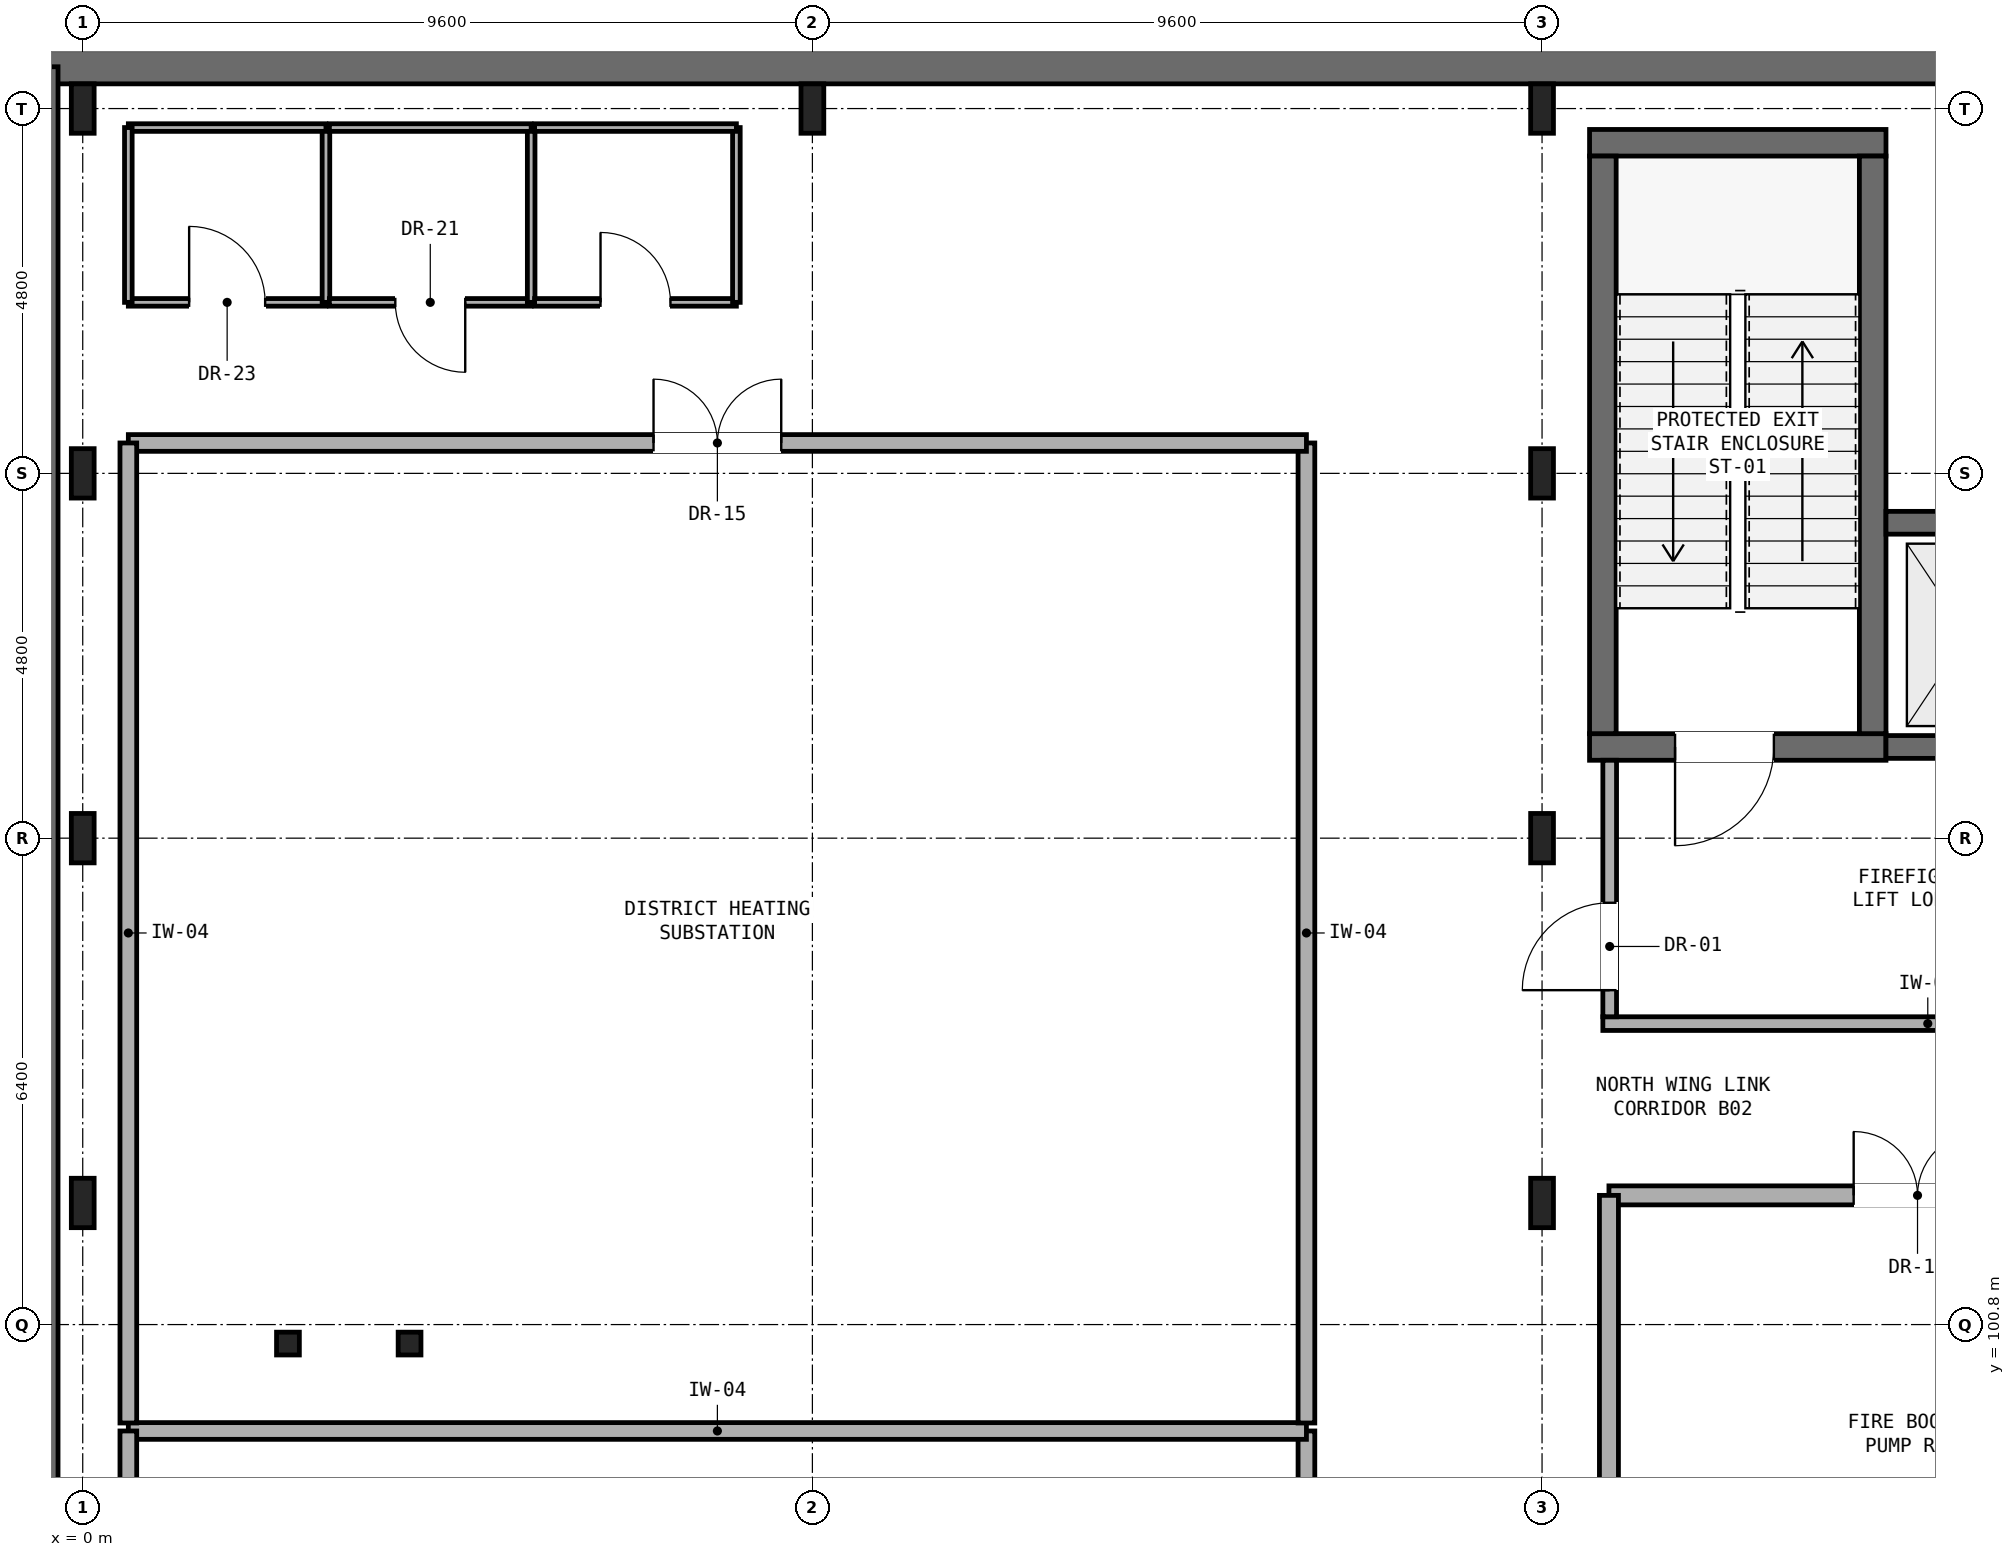
"""IFC4 building model, lengths in metres.
Left out: names, types, materials, properties, quantities, classifications, styles, units other than length and angle.
Written with IfcOpenShell. Run it as: python <this file> out.ifc"""

import sys

from ifc_helpers import new_model, si_unit, direction, frame, frame_2d, origin, origin_2d, place, context, subcontext, project, spatial, rectangle, i_section, extrude, element, fill, save


model = new_model("IFC4")
c1 = context("Model", 3, precision=1e-05, world=origin(), true_north=direction((0.0, 1.0)))
c2 = subcontext(c1, "Body", "Model", "MODEL_VIEW")
j1 = project(units=[si_unit("LENGTHUNIT", "METRE"), si_unit("PLANEANGLEUNIT", "RADIAN")], contexts=[c1])
p1 = place(None, origin())
s1 = spatial("IfcSite", under=j1, at=p1, CompositionType="ELEMENT")
p2 = place(p1, origin())
s2 = spatial("IfcBuilding", under=s1, at=p2, CompositionType="ELEMENT")
p3 = place(p2, frame((0.0, 0.0, -9.8)))
s3 = spatial("IfcBuildingStorey", under=s2, at=p3, CompositionType="ELEMENT", Elevation=-9.8)
for number, where, z_axis, x_axis in (
    (1, (0.0, 102.4, 0.0), (0.0, 0.0, 1.0), (1.0, 0.0, 0.0)),
    (2, (0.0, 107.2, 0.0), (0.0, 0.0, 1.0), (1.0, 0.0, 0.0)),
    (3, (0.0, 112.0, 0.0), (0.0, 0.0, 1.0), (1.0, 0.0, 0.0)),
    (4, (0.0, 116.8, 0.0), (0.0, 0.0, 1.0), (1.0, 0.0, 0.0)),
    (5, (9.6, 116.8, 0.0), (0.0, 0.0, 1.0), (1.0, 0.0, 0.0)),
    (6, (19.2, 116.8, 0.0), (0.0, 0.0, 1.0), (1.0, 0.0, 0.0)),
    (7, (19.2, 102.4, 0.0), (0.0, 0.0, 1.0), (1.0, 0.0, 0.0)),
    (8, (19.2, 107.2, 0.0), (0.0, 0.0, 1.0), (1.0, 0.0, 0.0)),
    (9, (19.2, 112.0, 0.0), (0.0, 0.0, 1.0), (1.0, 0.0, 0.0)),
):
    element("IfcColumn", number, at=place(p3, frame(where, z_axis=z_axis, x_axis=x_axis)), inside=s3, PredefinedType="COLUMN", context=c2, shape_type="SweptSolid", body=[
        extrude(i_section(OverallWidth=0.3, OverallDepth=0.65, WebThickness=0.016, FlangeThickness=0.031, FilletRadius=0.027, at=origin_2d()), origin(), (0.0, 0.0, 1.0), 5.25),
    ])
p4 = place(p3, frame((-0.55, 117.35, 0.0), z_axis=(0.0, 0.0, 1.0), x_axis=(1.0, 0.0, 0.0)))
e10 = element("IfcWall", 10, at=p4, inside=s3, PredefinedType="USERDEFINED", context=c2, shape_type="SweptSolid", body=[
    extrude(rectangle(XDim=87.5, YDim=0.45, at=frame_2d((43.75, 0.0))), origin(), (0.0, 0.0, 1.0), 5.25),
])
p5 = place(p3, frame((-0.55, 28.25, 0.0), z_axis=(0.0, 0.0, 1.0), x_axis=(0.0, 1.0, 0.0)))
e11 = element("IfcWall", 11, at=p5, inside=s3, PredefinedType="USERDEFINED", context=c2, shape_type="SweptSolid", body=[
    extrude(rectangle(XDim=89.1, YDim=0.45, at=frame_2d((44.55, 0.0))), origin(), (0.0, 0.0, 1.0), 5.25),
])
p6 = place(p3, frame((19.825, 108.4, 0.0), z_axis=(0.0, 0.0, 1.0), x_axis=(1.0, 0.0, 0.0)))
e12 = element("IfcWall", 12, at=p6, inside=s3, PredefinedType="SHEAR", context=c2, shape_type="SweptSolid", body=[
    extrude(rectangle(XDim=3.9, YDim=0.35, at=frame_2d((1.95, 0.0))), origin(), (0.0, 0.0, 1.0), 4.97),
])
p7 = place(p6, frame((1.125, 0.0, 0.0)))
e13 = element("IfcOpeningElement", 13, at=p7, cuts=e12, PredefinedType="OPENING", context=c2, shape_type="SweptSolid", body=[
    extrude(rectangle(XDim=1.3, YDim=2.15, at=frame_2d((0.65, 1.075))), frame((0.0, 0.185, 0.0), z_axis=(0.0, -1.0, 0.0), x_axis=(1.0, 0.0, 0.0)), (0.0, 0.0, 1.0), 0.37),
])
p8 = place(p3, frame((19.825, 116.35, 0.0), z_axis=(0.0, 0.0, 1.0), x_axis=(1.0, 0.0, 0.0)))
e14 = element("IfcWall", 14, at=p8, inside=s3, PredefinedType="SHEAR", context=c2, shape_type="SweptSolid", body=[
    extrude(rectangle(XDim=3.9, YDim=0.35, at=frame_2d((1.95, 0.0))), origin(), (0.0, 0.0, 1.0), 4.97),
])
for number, where, z_axis, x_axis in (
    (15, (20.0, 108.575, 0.0), (0.0, 0.0, 1.0), (0.0, 1.0, 0.0)),
    (16, (23.55, 108.575, 0.0), (0.0, 0.0, 1.0), (0.0, 1.0, 0.0)),
):
    element("IfcWall", number, at=place(p3, frame(where, z_axis=z_axis, x_axis=x_axis)), inside=s3, PredefinedType="SHEAR", context=c2, shape_type="SweptSolid", body=[
        extrude(rectangle(XDim=7.6, YDim=0.35, at=frame_2d((3.8, 0.0))), origin(), (0.0, 0.0, 1.0), 4.97),
    ])
p9 = place(p3, frame((23.725, 108.4, 0.0), z_axis=(0.0, 0.0, 1.0), x_axis=(1.0, 0.0, 0.0)))
e17 = element("IfcWall", 17, at=p9, inside=s3, PredefinedType="SHEAR", context=c2, shape_type="SweptSolid", body=[
    extrude(rectangle(XDim=2.5, YDim=0.3, at=frame_2d((1.25, 0.0))), origin(), (0.0, 0.0, 1.0), 4.97),
])
p10 = place(p9, frame((0.7, 0.0, 0.0)))
e18 = element("IfcOpeningElement", 18, at=p10, cuts=e17, PredefinedType="OPENING", context=c2, shape_type="SweptSolid", body=[
    extrude(rectangle(XDim=1.1, YDim=2.1, at=frame_2d((0.55, 1.05))), frame((0.0, 0.16, 0.0), z_axis=(0.0, -1.0, 0.0), x_axis=(1.0, 0.0, 0.0)), (0.0, 0.0, 1.0), 0.32),
])
p11 = place(p3, frame((23.725, 111.35, 0.0), z_axis=(0.0, 0.0, 1.0), x_axis=(1.0, 0.0, 0.0)))
e19 = element("IfcWall", 19, at=p11, inside=s3, PredefinedType="SHEAR", context=c2, shape_type="SweptSolid", body=[
    extrude(rectangle(XDim=2.5, YDim=0.3, at=frame_2d((1.25, 0.0))), origin(), (0.0, 0.0, 1.0), 4.97),
])
p12 = place(p3, frame((20.0, 104.76, 0.0), z_axis=(0.0, 0.0, 1.0), x_axis=(1.0, 0.0, 0.0)))
e20 = element("IfcWall", 20, at=p12, inside=s3, PredefinedType="PARTITIONING", context=c2, shape_type="SweptSolid", body=[
    extrude(rectangle(XDim=8.55, YDim=0.18, at=frame_2d((4.275, 0.0))), origin(), (0.0, 0.0, 1.0), 4.45),
])
p13 = place(p3, frame((20.09, 104.85, 0.0), z_axis=(0.0, 0.0, 1.0), x_axis=(0.0, 1.0, 0.0)))
e21 = element("IfcWall", 21, at=p13, inside=s3, PredefinedType="PARTITIONING", context=c2, shape_type="SweptSolid", body=[
    extrude(rectangle(XDim=3.375, YDim=0.18, at=frame_2d((1.688, 0.0))), origin(), (0.0, 0.0, 1.0), 4.97),
])
p14 = place(p13, frame((0.35, 0.0, 0.0)))
e22 = element("IfcOpeningElement", 22, at=p14, cuts=e21, PredefinedType="OPENING", context=c2, shape_type="SweptSolid", body=[
    extrude(rectangle(XDim=1.15, YDim=2.15, at=frame_2d((0.575, 1.075))), frame((0.0, 0.1, 0.0), z_axis=(0.0, -1.0, 0.0), x_axis=(1.0, 0.0, 0.0)), (0.0, 0.0, 1.0), 0.2),
])
for number, where, z_axis, x_axis in (
    (23, (2.7, 100.55, 0.0), (0.0, 0.0, 1.0), (1.0, 0.0, 0.0)),
    (24, (4.3, 100.55, 0.0), (0.0, 0.0, 1.0), (1.0, 0.0, 0.0)),
):
    element("IfcColumn", number, at=place(p3, frame(where, z_axis=z_axis, x_axis=x_axis)), inside=s3, PredefinedType="COLUMN", context=c2, shape_type="SweptSolid", body=[
        extrude(i_section(OverallWidth=0.3, OverallDepth=0.3, WebThickness=0.011, FlangeThickness=0.019, FilletRadius=0.027, at=origin_2d()), origin(), (0.0, 0.0, 1.0), 5.25),
    ])
p15 = place(p3, frame((16.1, 83.8, 0.0), z_axis=(0.0, 0.0, 1.0), x_axis=(0.0, 1.0, 0.0)))
e25 = element("IfcWall", 25, at=p15, inside=s3, PredefinedType="PARTITIONING", context=c2, shape_type="SweptSolid", body=[
    extrude(rectangle(XDim=15.6, YDim=0.22, at=frame_2d((7.8, 0.0))), origin(), (0.0, 0.0, 1.0), 4.97),
])
p16 = place(p15, frame((6.96, 0.0, 0.0)))
e26 = element("IfcOpeningElement", 26, at=p16, cuts=e25, PredefinedType="OPENING", context=c2, shape_type="SweptSolid", body=[
    extrude(rectangle(XDim=1.68, YDim=2.2, at=frame_2d((0.84, 1.1))), frame((0.0, 0.12, 0.0), z_axis=(0.0, -1.0, 0.0), x_axis=(1.0, 0.0, 0.0)), (0.0, 0.0, 1.0), 0.24),
])
p17 = place(p3, frame((16.1, 99.4, 0.0), z_axis=(0.0, 0.0, 1.0), x_axis=(-1.0, 0.0, 0.0)))
e27 = element("IfcWall", 27, at=p17, inside=s3, PredefinedType="PARTITIONING", context=c2, shape_type="SweptSolid", body=[
    extrude(rectangle(XDim=15.5, YDim=0.22, at=frame_2d((7.75, 0.0))), origin(), (0.0, 0.0, 1.0), 4.97),
])
p18 = place(p3, frame((0.6, 99.4, 0.0), z_axis=(0.0, 0.0, 1.0), x_axis=(0.0, -1.0, 0.0)))
e28 = element("IfcWall", 28, at=p18, inside=s3, PredefinedType="PARTITIONING", context=c2, shape_type="SweptSolid", body=[
    extrude(rectangle(XDim=15.6, YDim=0.22, at=frame_2d((7.8, 0.0))), origin(), (0.0, 0.0, 1.0), 4.97),
])
p19 = place(p3, frame((16.1, 99.505, 0.0), z_axis=(0.0, 0.0, 1.0), x_axis=(0.0, 1.0, 0.0)))
e29 = element("IfcWall", 29, at=p19, inside=s3, PredefinedType="PARTITIONING", context=c2, shape_type="SweptSolid", body=[
    extrude(rectangle(XDim=12.895, YDim=0.22, at=frame_2d((6.448, 0.0))), origin(), (0.0, 0.0, 1.0), 4.97),
])
p20 = place(p3, frame((16.1, 112.4, 0.0), z_axis=(0.0, 0.0, 1.0), x_axis=(-1.0, 0.0, 0.0)))
e30 = element("IfcWall", 30, at=p20, inside=s3, PredefinedType="PARTITIONING", context=c2, shape_type="SweptSolid", body=[
    extrude(rectangle(XDim=15.5, YDim=0.22, at=frame_2d((7.75, 0.0))), origin(), (0.0, 0.0, 1.0), 4.97),
])
p21 = place(p20, frame((6.91, 0.0, 0.0)))
e31 = element("IfcOpeningElement", 31, at=p21, cuts=e30, PredefinedType="OPENING", context=c2, shape_type="SweptSolid", body=[
    extrude(rectangle(XDim=1.68, YDim=2.2, at=frame_2d((0.84, 1.1))), frame((0.0, 0.12, 0.0), z_axis=(0.0, -1.0, 0.0), x_axis=(1.0, 0.0, 0.0)), (0.0, 0.0, 1.0), 0.24),
])
p22 = place(p3, frame((0.6, 112.4, 0.0), z_axis=(0.0, 0.0, 1.0), x_axis=(0.0, -1.0, 0.0)))
e32 = element("IfcWall", 32, at=p22, inside=s3, PredefinedType="PARTITIONING", context=c2, shape_type="SweptSolid", body=[
    extrude(rectangle(XDim=12.895, YDim=0.22, at=frame_2d((6.448, 0.0))), origin(), (0.0, 0.0, 1.0), 4.97),
])
p23 = place(p3, frame((0.6, 114.25, 0.0), z_axis=(0.0, 0.0, 1.0), x_axis=(1.0, 0.0, 0.0)))
e33 = element("IfcWall", 33, at=p23, inside=s3, PredefinedType="PARTITIONING", context=c2, shape_type="SweptSolid", body=[
    extrude(rectangle(XDim=2.6, YDim=0.1, at=frame_2d((1.3, 0.0))), origin(), (0.0, 0.0, 1.0), 4.45),
])
p24 = place(p23, frame((0.8, 0.0, 0.0)))
e34 = element("IfcOpeningElement", 34, at=p24, cuts=e33, PredefinedType="OPENING", context=c2, shape_type="SweptSolid", body=[
    extrude(rectangle(XDim=1.0, YDim=2.08, at=frame_2d((0.5, 1.04))), frame((0.0, 0.06, 0.0), z_axis=(0.0, -1.0, 0.0), x_axis=(1.0, 0.0, 0.0)), (0.0, 0.0, 1.0), 0.12),
])
p25 = place(p3, frame((3.2, 114.25, 0.0), z_axis=(0.0, 0.0, 1.0), x_axis=(0.0, 1.0, 0.0)))
e35 = element("IfcWall", 35, at=p25, inside=s3, PredefinedType="PARTITIONING", context=c2, shape_type="SweptSolid", body=[
    extrude(rectangle(XDim=2.3, YDim=0.1, at=frame_2d((1.15, 0.0))), origin(), (0.0, 0.0, 1.0), 4.97),
])
p26 = place(p3, frame((3.2, 116.55, 0.0), z_axis=(0.0, 0.0, 1.0), x_axis=(-1.0, 0.0, 0.0)))
e36 = element("IfcWall", 36, at=p26, inside=s3, PredefinedType="PARTITIONING", context=c2, shape_type="SweptSolid", body=[
    extrude(rectangle(XDim=2.6, YDim=0.1, at=frame_2d((1.3, 0.0))), origin(), (0.0, 0.0, 1.0), 4.05),
])
p27 = place(p3, frame((0.6, 116.55, 0.0), z_axis=(0.0, 0.0, 1.0), x_axis=(0.0, -1.0, 0.0)))
e37 = element("IfcWall", 37, at=p27, inside=s3, PredefinedType="PARTITIONING", context=c2, shape_type="SweptSolid", body=[
    extrude(rectangle(XDim=2.3, YDim=0.1, at=frame_2d((1.15, 0.0))), origin(), (0.0, 0.0, 1.0), 4.97),
])
p28 = place(p3, frame((3.245, 114.25, 0.0), z_axis=(0.0, 0.0, 1.0), x_axis=(1.0, 0.0, 0.0)))
e38 = element("IfcWall", 38, at=p28, inside=s3, PredefinedType="PARTITIONING", context=c2, shape_type="SweptSolid", body=[
    extrude(rectangle(XDim=2.655, YDim=0.1, at=frame_2d((1.327, 0.0))), origin(), (0.0, 0.0, 1.0), 4.45),
])
p29 = place(p28, frame((0.867, 0.0, 0.0)))
e39 = element("IfcOpeningElement", 39, at=p29, cuts=e38, PredefinedType="OPENING", context=c2, shape_type="SweptSolid", body=[
    extrude(rectangle(XDim=0.92, YDim=2.08, at=frame_2d((0.46, 1.04))), frame((0.0, 0.06, 0.0), z_axis=(0.0, -1.0, 0.0), x_axis=(1.0, 0.0, 0.0)), (0.0, 0.0, 1.0), 0.12),
])
p30 = place(p3, frame((5.9, 114.25, 0.0), z_axis=(0.0, 0.0, 1.0), x_axis=(0.0, 1.0, 0.0)))
e40 = element("IfcWall", 40, at=p30, inside=s3, PredefinedType="PARTITIONING", context=c2, shape_type="SweptSolid", body=[
    extrude(rectangle(XDim=2.3, YDim=0.1, at=frame_2d((1.15, 0.0))), origin(), (0.0, 0.0, 1.0), 4.97),
])
p31 = place(p3, frame((5.9, 116.55, 0.0), z_axis=(0.0, 0.0, 1.0), x_axis=(-1.0, 0.0, 0.0)))
e41 = element("IfcWall", 41, at=p31, inside=s3, PredefinedType="PARTITIONING", context=c2, shape_type="SweptSolid", body=[
    extrude(rectangle(XDim=2.655, YDim=0.1, at=frame_2d((1.327, 0.0))), origin(), (0.0, 0.0, 1.0), 4.05),
])
p32 = place(p3, frame((5.945, 114.25, 0.0), z_axis=(0.0, 0.0, 1.0), x_axis=(1.0, 0.0, 0.0)))
e42 = element("IfcWall", 42, at=p32, inside=s3, PredefinedType="PARTITIONING", context=c2, shape_type="SweptSolid", body=[
    extrude(rectangle(XDim=2.655, YDim=0.1, at=frame_2d((1.328, 0.0))), origin(), (0.0, 0.0, 1.0), 4.45),
])
p33 = place(p32, frame((0.867, 0.0, 0.0)))
e43 = element("IfcOpeningElement", 43, at=p33, cuts=e42, PredefinedType="OPENING", context=c2, shape_type="SweptSolid", body=[
    extrude(rectangle(XDim=0.92, YDim=2.08, at=frame_2d((0.46, 1.04))), frame((0.0, 0.06, 0.0), z_axis=(0.0, -1.0, 0.0), x_axis=(1.0, 0.0, 0.0)), (0.0, 0.0, 1.0), 0.12),
])
p34 = place(p3, frame((8.6, 114.25, 0.0), z_axis=(0.0, 0.0, 1.0), x_axis=(0.0, 1.0, 0.0)))
e44 = element("IfcWall", 44, at=p34, inside=s3, PredefinedType="PARTITIONING", context=c2, shape_type="SweptSolid", body=[
    extrude(rectangle(XDim=2.3, YDim=0.1, at=frame_2d((1.15, 0.0))), origin(), (0.0, 0.0, 1.0), 4.97),
])
p35 = place(p3, frame((8.6, 116.55, 0.0), z_axis=(0.0, 0.0, 1.0), x_axis=(-1.0, 0.0, 0.0)))
e45 = element("IfcWall", 45, at=p35, inside=s3, PredefinedType="PARTITIONING", context=c2, shape_type="SweptSolid", body=[
    extrude(rectangle(XDim=2.655, YDim=0.1, at=frame_2d((1.328, 0.0))), origin(), (0.0, 0.0, 1.0), 4.05),
])
p36 = place(p3, frame((28.2, 102.5, 0.0), z_axis=(0.0, 0.0, 1.0), x_axis=(-1.0, 0.0, 0.0)))
e46 = element("IfcWall", 46, at=p36, inside=s3, PredefinedType="SOLIDWALL", context=c2, shape_type="SweptSolid", body=[
    extrude(rectangle(XDim=8.12, YDim=0.25, at=frame_2d((4.06, 0.0))), origin(), (0.0, 0.0, 1.0), 4.05),
])
p37 = place(p36, frame((3.22, 0.0, 0.0)))
e47 = element("IfcOpeningElement", 47, at=p37, cuts=e46, PredefinedType="OPENING", context=c2, shape_type="SweptSolid", body=[
    extrude(rectangle(XDim=1.68, YDim=2.2, at=frame_2d((0.84, 1.1))), frame((0.0, 0.135, 0.0), z_axis=(0.0, -1.0, 0.0), x_axis=(1.0, 0.0, 0.0)), (0.0, 0.0, 1.0), 0.27),
])
p38 = place(p3, frame((20.08, 102.5, 0.0), z_axis=(0.0, 0.0, 1.0), x_axis=(0.0, -1.0, 0.0)))
e48 = element("IfcWall", 48, at=p38, inside=s3, PredefinedType="SOLIDWALL", context=c2, shape_type="SweptSolid", body=[
    extrude(rectangle(XDim=6.58, YDim=0.25, at=frame_2d((3.29, 0.0))), origin(), (0.0, 0.0, 1.0), 4.97),
])
p39 = place(p7, frame((1.3, 0.0, 0.0), z_axis=(0.0, 0.0, 1.0), x_axis=(-1.0, 0.0, 0.0)))
e49 = element("IfcDoor", 49, at=p39, inside=s3, OperationType="SINGLE_SWING_LEFT", PredefinedType="DOOR", context=c2, shape_type="SweptSolid", body=[
    extrude(rectangle(XDim=1.3, YDim=2.15, at=frame_2d((0.65, 1.075))), frame((0.0, 0.025, 0.0), z_axis=(0.0, -1.0, 0.0), x_axis=(1.0, 0.0, 0.0)), (0.0, 0.0, 1.0), 0.05),
])
fill(e13, e49)
p40 = place(p14, origin())
e50 = element("IfcDoor", 50, at=p40, inside=s3, OperationType="SINGLE_SWING_LEFT", PredefinedType="DOOR", context=c2, shape_type="SweptSolid", body=[
    extrude(rectangle(XDim=1.15, YDim=2.15, at=frame_2d((0.575, 1.075))), frame((0.0, 0.025, 0.0), z_axis=(0.0, -1.0, 0.0), x_axis=(1.0, 0.0, 0.0)), (0.0, 0.0, 1.0), 0.05),
])
fill(e22, e50)
p41 = place(p21, frame((1.68, 0.0, 0.0), z_axis=(0.0, 0.0, 1.0), x_axis=(-1.0, 0.0, 0.0)))
e51 = element("IfcDoor", 51, at=p41, inside=s3, OperationType="DOUBLE_DOOR_SINGLE_SWING", PredefinedType="DOOR", context=c2, shape_type="SweptSolid", body=[
    extrude(rectangle(XDim=1.68, YDim=2.2, at=frame_2d((0.84, 1.1))), frame((0.0, 0.025, 0.0), z_axis=(0.0, -1.0, 0.0), x_axis=(1.0, 0.0, 0.0)), (0.0, 0.0, 1.0), 0.05),
])
fill(e31, e51)
p42 = place(p24, origin())
e52 = element("IfcDoor", 52, at=p42, inside=s3, OperationType="SINGLE_SWING_LEFT", PredefinedType="DOOR", context=c2, shape_type="SweptSolid", body=[
    extrude(rectangle(XDim=1.0, YDim=2.08, at=frame_2d((0.5, 1.04))), frame((0.0, 0.025, 0.0), z_axis=(0.0, -1.0, 0.0), x_axis=(1.0, 0.0, 0.0)), (0.0, 0.0, 1.0), 0.05),
])
fill(e34, e52)
p43 = place(p29, frame((0.92, 0.0, 0.0), z_axis=(0.0, 0.0, 1.0), x_axis=(-1.0, 0.0, 0.0)))
e53 = element("IfcDoor", 53, at=p43, inside=s3, OperationType="SINGLE_SWING_RIGHT", PredefinedType="DOOR", context=c2, shape_type="SweptSolid", body=[
    extrude(rectangle(XDim=0.92, YDim=2.08, at=frame_2d((0.46, 1.04))), frame((0.0, 0.025, 0.0), z_axis=(0.0, -1.0, 0.0), x_axis=(1.0, 0.0, 0.0)), (0.0, 0.0, 1.0), 0.05),
])
fill(e39, e53)
p44 = place(p33, origin())
e54 = element("IfcDoor", 54, at=p44, inside=s3, OperationType="SINGLE_SWING_LEFT", PredefinedType="DOOR", context=c2, shape_type="SweptSolid", body=[
    extrude(rectangle(XDim=0.92, YDim=2.08, at=frame_2d((0.46, 1.04))), frame((0.0, 0.025, 0.0), z_axis=(0.0, -1.0, 0.0), x_axis=(1.0, 0.0, 0.0)), (0.0, 0.0, 1.0), 0.05),
])
fill(e43, e54)
p45 = place(p37, frame((1.68, 0.0, 0.0), z_axis=(0.0, 0.0, 1.0), x_axis=(-1.0, 0.0, 0.0)))
e55 = element("IfcDoor", 55, at=p45, inside=s3, OperationType="DOUBLE_DOOR_SINGLE_SWING", PredefinedType="DOOR", context=c2, shape_type="SweptSolid", body=[
    extrude(rectangle(XDim=1.68, YDim=2.2, at=frame_2d((0.84, 1.1))), frame((0.0, 0.025, 0.0), z_axis=(0.0, -1.0, 0.0), x_axis=(1.0, 0.0, 0.0)), (0.0, 0.0, 1.0), 0.05),
])
fill(e47, e55)
save(model, sys.argv[1])
